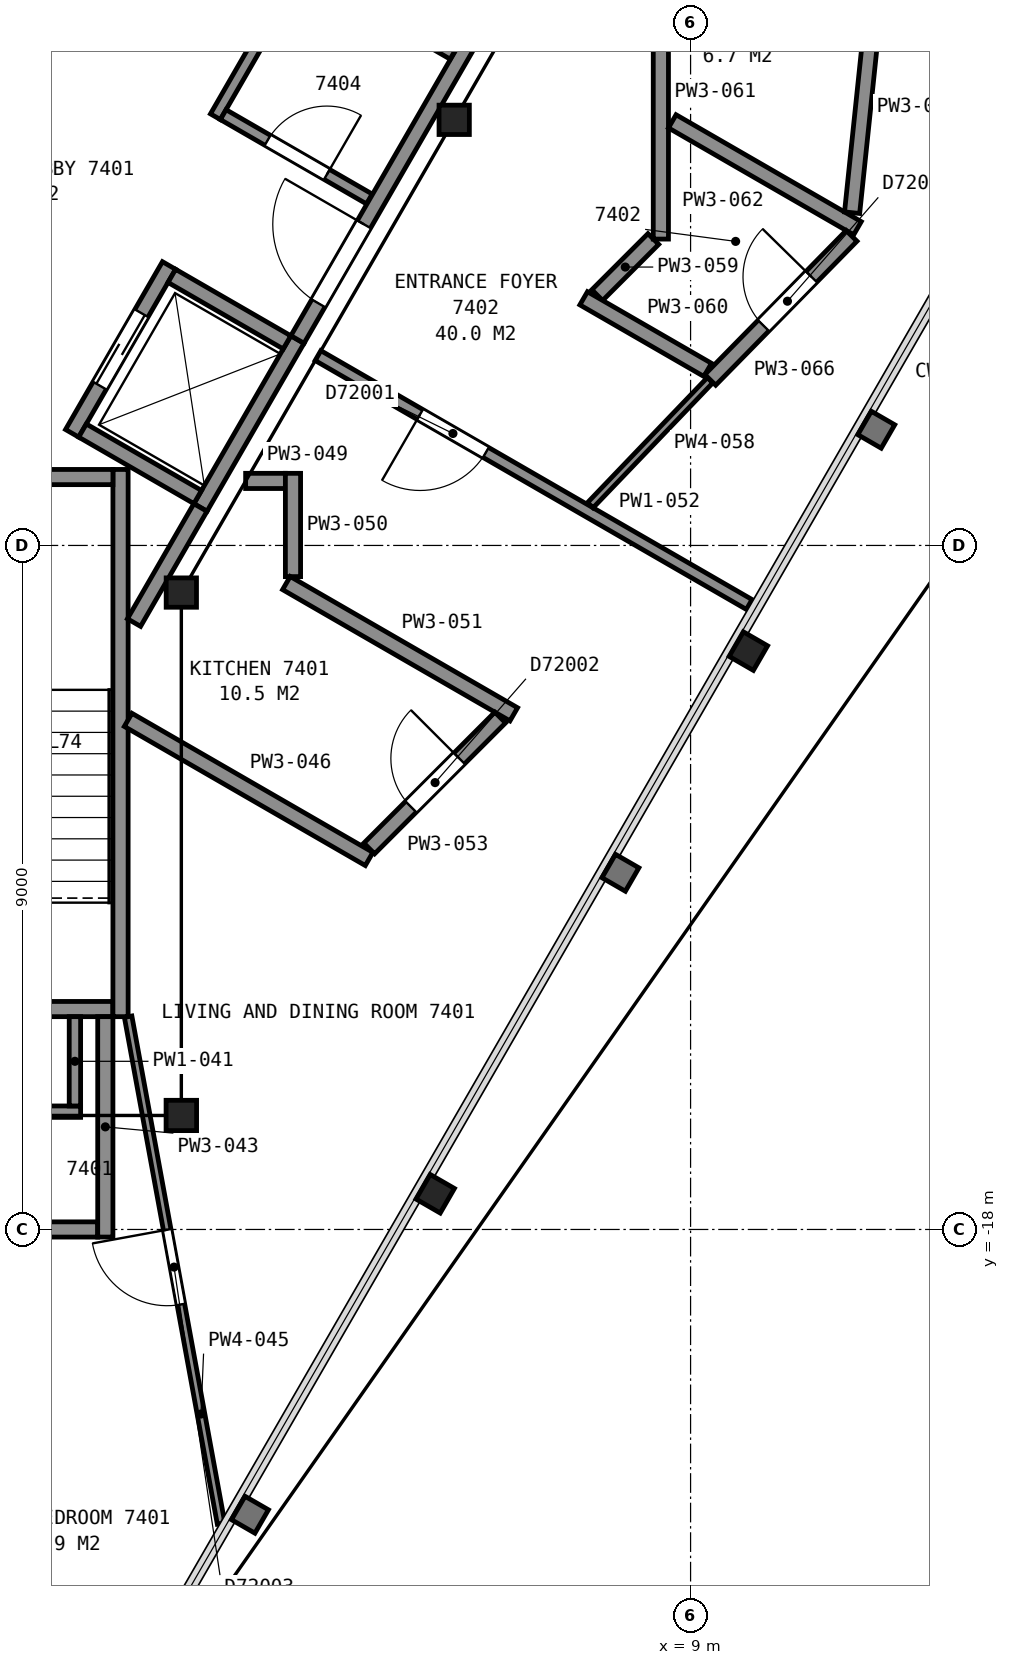
"""IFC4 building model, lengths in metres.
Left out: names, types, materials, properties, quantities, classifications, styles, units other than length and angle.
Written with IfcOpenShell. Run it as: python <this file> out.ifc"""

import sys

from ifc_helpers import new_model, si_unit, direction, frame, frame_2d, origin, origin_2d, place, context, subcontext, project, spatial, rectangle, i_section, extrude, element, fill, save


model = new_model("IFC4")
c1 = context("Model", 3, precision=1e-05, world=origin(), true_north=direction((0.0, 1.0)))
c2 = subcontext(c1, "Body", "Model", "MODEL_VIEW")
j1 = project(units=[si_unit("LENGTHUNIT", "METRE"), si_unit("PLANEANGLEUNIT", "RADIAN")], contexts=[c1])
p1 = place(None, origin())
s1 = spatial("IfcSite", under=j1, at=p1, CompositionType="ELEMENT")
p2 = place(p1, origin())
s2 = spatial("IfcBuilding", under=s1, at=p2, CompositionType="ELEMENT")
p3 = place(p2, frame((0.0, 0.0, 293.6)))
s3 = spatial("IfcBuildingStorey", under=s2, at=p3, CompositionType="ELEMENT", Elevation=293.6)
for number, where, z_axis, x_axis in (
    (1, (5.64, -17.53, 0.0), (0.0, 0.0, 1.0), (-0.5, -0.866, 0.0)),
    (2, (9.76, -10.39, 0.0), (0.0, 0.0, 1.0), (-0.5, -0.866, 0.0)),
):
    element("IfcColumn", number, at=place(p3, frame(where, z_axis=z_axis, x_axis=x_axis)), inside=s3, PredefinedType="COLUMN", context=c2, shape_type="SweptSolid", body=[
        extrude(i_section(OverallWidth=0.373, OverallDepth=0.368, WebThickness=0.015, FlangeThickness=0.024, FilletRadius=0.015, at=origin_2d()), origin(), (0.0, 0.0, 1.0), 3.7),
    ])
p4 = place(p3, frame((2.3, -16.5, 0.0), z_axis=(0.0, 0.0, 1.0), x_axis=(-1.0, 0.0, 0.0)))
e3 = element("IfcColumn", 3, at=p4, inside=s3, PredefinedType="COLUMN", context=c2, shape_type="SweptSolid", body=[
    extrude(i_section(OverallWidth=0.401, OverallDepth=0.399, WebThickness=0.025, FlangeThickness=0.04, FilletRadius=0.015, at=origin_2d()), origin(), (0.0, 0.0, 1.0), 3.7),
])
for number, where, z_axis, x_axis in (
    (4, (2.3, -9.62, 0.0), (0.0, 0.0, 1.0), (1.0, 0.0, 0.0)),
    (5, (5.89, -3.4, 0.0), (0.0, 0.0, 1.0), (1.0, 0.0, 0.0)),
):
    element("IfcColumn", number, at=place(p3, frame(where, z_axis=z_axis, x_axis=x_axis)), inside=s3, PredefinedType="COLUMN", context=c2, shape_type="SweptSolid", body=[
        extrude(i_section(OverallWidth=0.399, OverallDepth=0.386, WebThickness=0.021, FlangeThickness=0.033, FilletRadius=0.015, at=origin_2d()), origin(), (0.0, 0.0, 1.0), 3.7),
    ])
p5 = place(p3, frame((-1.4, -15.1, 0.0), z_axis=(0.0, 0.0, 1.0), x_axis=(1.0, 0.0, 0.0)))
e6 = element("IfcWall", 6, at=p5, inside=s3, PredefinedType="PARTITIONING", context=c2, shape_type="SweptSolid", body=[
    extrude(rectangle(XDim=2.8, YDim=0.2, at=frame_2d((1.4, 0.0))), origin(), (0.0, 0.0, 1.0), 3.45),
])
p6 = place(p5, frame((0.85, 0.0, 0.0)))
e7 = element("IfcOpeningElement", 7, at=p6, cuts=e6, PredefinedType="OPENING", context=c2, shape_type="SweptSolid", body=[
    extrude(rectangle(XDim=1.1, YDim=2.1, at=frame_2d((0.55, 1.05))), frame((0.0, 0.11, 0.0), z_axis=(0.0, -1.0, 0.0), x_axis=(1.0, 0.0, 0.0)), (0.0, 0.0, 1.0), 0.22),
])
p7 = place(p3, frame((1.5, -8.0, 0.0), z_axis=(0.0, 0.0, 1.0), x_axis=(0.0, -1.0, 0.0)))
e8 = element("IfcWall", 8, at=p7, inside=s3, PredefinedType="PARTITIONING", context=c2, shape_type="SweptSolid", body=[
    extrude(rectangle(XDim=7.2, YDim=0.2, at=frame_2d((3.6, 0.0))), origin(), (0.0, 0.0, 1.0), 3.45),
])
p8 = place(p3, frame((-1.4, -8.1, 0.0), z_axis=(0.0, 0.0, 1.0), x_axis=(1.0, 0.0, 0.0)))
e9 = element("IfcWall", 9, at=p8, inside=s3, PredefinedType="PARTITIONING", context=c2, shape_type="SweptSolid", body=[
    extrude(rectangle(XDim=2.8, YDim=0.2, at=frame_2d((1.4, 0.0))), origin(), (0.0, 0.0, 1.0), 3.45),
])
p9 = place(p3, frame((2.552, -8.5, 0.0), z_axis=(0.0, 0.0, 1.0), x_axis=(0.499990435942, 0.866030925526, 0.0)))
e10 = element("IfcWall", 10, at=p9, inside=s3, PredefinedType="PARTITIONING", context=c2, shape_type="SweptSolid", body=[
    extrude(rectangle(XDim=2.55, YDim=0.2, at=frame_2d((1.275, 0.0))), origin(), (0.0, 0.0, 1.0), 3.7),
])
p10 = place(p3, frame((0.863, -7.525, 0.0), z_axis=(0.0, 0.0, 1.0), x_axis=(0.499990435942, 0.866030925526, 0.0)))
e11 = element("IfcWall", 11, at=p10, inside=s3, PredefinedType="PARTITIONING", context=c2, shape_type="SweptSolid", body=[
    extrude(rectangle(XDim=2.55, YDim=0.2, at=frame_2d((1.275, 0.0))), origin(), (0.0, 0.0, 1.0), 3.7),
])
p11 = place(p10, frame((0.725, 0.0, 0.0)))
e12 = element("IfcOpeningElement", 12, at=p11, cuts=e11, PredefinedType="OPENING", context=c2, shape_type="SweptSolid", body=[
    extrude(rectangle(XDim=1.1, YDim=2.1, at=frame_2d((0.55, 1.05))), frame((0.0, 0.11, 0.0), z_axis=(0.0, -1.0, 0.0), x_axis=(1.0, 0.0, 0.0)), (0.0, 0.0, 1.0), 0.22),
])
for number, where, z_axis, x_axis in (
    (13, (3.69, -6.328, 0.0), (0.0, 0.0, 1.0), (-0.866, 0.5, 0.0)),
    (14, (2.515, -8.363, 0.0), (0.0, 0.0, 1.0), (-0.866, 0.5, 0.0)),
):
    element("IfcWall", number, at=place(p3, frame(where, z_axis=z_axis, x_axis=x_axis)), inside=s3, PredefinedType="PARTITIONING", context=c2, shape_type="SweptSolid", body=[
        extrude(rectangle(XDim=1.75, YDim=0.2, at=frame_2d((0.875, 0.0))), origin(), (0.0, 0.0, 1.0), 3.7),
    ])
p12 = place(p3, frame((1.677, -10.015, 0.0), z_axis=(0.0, 0.0, 1.0), x_axis=(0.49983532306, 0.866120459187, 0.0)))
e15 = element("IfcWall", 15, at=p12, inside=s3, PredefinedType="PARTITIONING", context=c2, shape_type="SweptSolid", body=[
    extrude(rectangle(XDim=1.748, YDim=0.2, at=frame_2d((0.874, 0.0))), origin(), (0.0, 0.0, 1.0), 3.45),
])
p13 = place(p3, frame((2.749, -3.359, 0.0), z_axis=(0.0, 0.0, 1.0), x_axis=(0.500017827812, 0.866015110648, 0.0)))
e16 = element("IfcWall", 16, at=p13, inside=s3, PredefinedType="PARTITIONING", context=c2, shape_type="SweptSolid", body=[
    extrude(rectangle(XDim=4.15, YDim=0.15, at=frame_2d((2.075, 0.0))), origin(), (0.0, 0.0, 1.0), 3.45),
])
p14 = place(p3, frame((2.851, -3.332, 0.0), z_axis=(0.0, 0.0, 1.0), x_axis=(0.866110524189, -0.499852538144, 0.0)))
e17 = element("IfcWall", 17, at=p14, inside=s3, PredefinedType="PARTITIONING", context=c2, shape_type="SweptSolid", body=[
    extrude(rectangle(XDim=2.22, YDim=0.15, at=frame_2d((1.11, 0.0))), origin(), (0.0, 0.0, 1.0), 3.45),
])
p15 = place(p14, frame((0.675, 0.0, 0.0)))
e18 = element("IfcOpeningElement", 18, at=p15, cuts=e17, PredefinedType="OPENING", context=c2, shape_type="SweptSolid", body=[
    extrude(rectangle(XDim=0.9, YDim=2.1, at=frame_2d((0.45, 1.05))), frame((0.0, 0.085, 0.0), z_axis=(0.0, -1.0, 0.0), x_axis=(1.0, 0.0, 0.0)), (0.0, 0.0, 1.0), 0.17),
])
p16 = place(p3, frame((3.828, -6.29, 0.0), z_axis=(0.0, 0.0, 1.0), x_axis=(0.499979739078, 0.866037101117, 0.0)))
e19 = element("IfcWall", 19, at=p16, inside=s3, PredefinedType="PARTITIONING", context=c2, shape_type="SweptSolid", body=[
    extrude(rectangle(XDim=11.363, YDim=0.2, at=frame_2d((5.681, 0.0))), origin(), (0.0, 0.0, 1.0), 3.45),
])
p17 = place(p16, frame((0.55, 0.0, 0.0)))
e20 = element("IfcOpeningElement", 20, at=p17, cuts=e19, PredefinedType="OPENING", context=c2, shape_type="SweptSolid", body=[
    extrude(rectangle(XDim=1.2, YDim=2.1, at=frame_2d((0.6, 1.05))), frame((0.0, 0.11, 0.0), z_axis=(0.0, -1.0, 0.0), x_axis=(1.0, 0.0, 0.0)), (0.0, 0.0, 1.0), 0.22),
])
p18 = place(p3, frame((3.951, -1.427, 0.0), z_axis=(0.0, 0.0, 1.0), x_axis=(0.866062920605, -0.499935013329, 0.0)))
e21 = element("IfcWall", 21, at=p18, inside=s3, PredefinedType="PARTITIONING", context=c2, shape_type="SweptSolid", body=[
    extrude(rectangle(XDim=2.22, YDim=0.15, at=frame_2d((1.11, 0.0))), origin(), (0.0, 0.0, 1.0), 3.45),
])
p19 = place(p3, frame((-1.65, -16.45, 0.0), z_axis=(0.0, 0.0, 1.0), x_axis=(1.0, 0.0, 0.0)))
e22 = element("IfcWall", 22, at=p19, inside=s3, PredefinedType="PARTITIONING", context=c2, shape_type="SweptSolid", body=[
    extrude(rectangle(XDim=2.625, YDim=0.15, at=frame_2d((1.312, 0.0))), origin(), (0.0, 0.0, 1.0), 2.723),
])
p20 = place(p3, frame((-1.211, -18.0, 0.0), z_axis=(0.0, 0.0, 1.0), x_axis=(1.0, 0.0, 0.0)))
e23 = element("IfcWall", 23, at=p20, inside=s3, PredefinedType="PARTITIONING", context=c2, shape_type="SweptSolid", body=[
    extrude(rectangle(XDim=2.411, YDim=0.2, at=frame_2d((1.206, 0.0))), origin(), (0.0, 0.0, 1.0), 2.723),
])
p21 = place(p20, frame((0.825, 0.0, 0.0)))
e24 = element("IfcOpeningElement", 24, at=p21, cuts=e23, PredefinedType="OPENING", context=c2, shape_type="SweptSolid", body=[
    extrude(rectangle(XDim=0.8, YDim=2.1, at=frame_2d((0.4, 1.05))), frame((0.0, 0.11, 0.0), z_axis=(0.0, -1.0, 0.0), x_axis=(1.0, 0.0, 0.0)), (0.0, 0.0, 1.0), 0.22),
])
p22 = place(p3, frame((0.9, -16.375, 0.0), z_axis=(0.0, 0.0, 1.0), x_axis=(0.0, 1.0, 0.0)))
e25 = element("IfcWall", 25, at=p22, inside=s3, PredefinedType="PARTITIONING", context=c2, shape_type="SweptSolid", body=[
    extrude(rectangle(XDim=1.175, YDim=0.15, at=frame_2d((0.587, 0.0))), origin(), (0.0, 0.0, 1.0), 2.723),
])
p23 = place(p3, frame((1.3, -18.1, 0.0), z_axis=(0.0, 0.0, 1.0), x_axis=(0.0, 1.0, 0.0)))
e26 = element("IfcWall", 26, at=p23, inside=s3, PredefinedType="PARTITIONING", context=c2, shape_type="SweptSolid", body=[
    extrude(rectangle(XDim=2.9, YDim=0.2, at=frame_2d((1.45, 0.0))), origin(), (0.0, 0.0, 1.0), 2.723),
])
p24 = place(p3, frame((2.823, -21.869, 0.0), z_axis=(0.0, 0.0, 1.0), x_axis=(-0.180317418333, 0.983608473248, 0.0)))
e27 = element("IfcWall", 27, at=p24, inside=s3, PredefinedType="PARTITIONING", context=c2, shape_type="SweptSolid", body=[
    extrude(rectangle(XDim=6.781, YDim=0.1, at=frame_2d((3.39, 0.0))), origin(), (0.0, 0.0, 1.0), 2.723),
])
p25 = place(p24, frame((2.931, 0.0, 0.0)))
e28 = element("IfcOpeningElement", 28, at=p25, cuts=e27, PredefinedType="OPENING", context=c2, shape_type="SweptSolid", body=[
    extrude(rectangle(XDim=1.0, YDim=2.1, at=frame_2d((0.5, 1.05))), frame((0.0, 0.06, 0.0), z_axis=(0.0, -1.0, 0.0), x_axis=(1.0, 0.0, 0.0)), (0.0, 0.0, 1.0), 0.12),
])
p26 = place(p3, frame((1.6, -11.295, 0.0), z_axis=(0.0, 0.0, 1.0), x_axis=(0.866067869506, -0.499926439998, 0.0)))
e29 = element("IfcWall", 29, at=p26, inside=s3, PredefinedType="PARTITIONING", context=c2, shape_type="SweptSolid", body=[
    extrude(rectangle(XDim=3.661, YDim=0.2, at=frame_2d((1.83, 0.0))), origin(), (0.0, 0.0, 1.0), 2.723),
])
p27 = place(p3, frame((3.146, -8.151, 0.0), z_axis=(0.0, 0.0, 1.0), x_axis=(1.0, 0.0, 0.0)))
e30 = element("IfcWall", 30, at=p27, inside=s3, PredefinedType="PARTITIONING", context=c2, shape_type="SweptSolid", body=[
    extrude(rectangle(XDim=0.523, YDim=0.2, at=frame_2d((0.261, 0.0))), origin(), (0.0, 0.0, 1.0), 2.723),
])
p28 = place(p3, frame((3.769, -9.41, 0.0), z_axis=(0.0, 0.0, 1.0), x_axis=(0.0, 1.0, 0.0)))
e31 = element("IfcWall", 31, at=p28, inside=s3, PredefinedType="PARTITIONING", context=c2, shape_type="SweptSolid", body=[
    extrude(rectangle(XDim=1.359, YDim=0.2, at=frame_2d((0.679, 0.0))), origin(), (0.0, 0.0, 1.0), 2.723),
])
p29 = place(p3, frame((3.682, -9.495, 0.0), z_axis=(0.0, 0.0, 1.0), x_axis=(0.866046690806, -0.499963127985, 0.0)))
e32 = element("IfcWall", 32, at=p29, inside=s3, PredefinedType="PARTITIONING", context=c2, shape_type="SweptSolid", body=[
    extrude(rectangle(XDim=3.454, YDim=0.2, at=frame_2d((1.727, 0.0))), origin(), (0.0, 0.0, 1.0), 2.723),
])
p30 = place(p3, frame((9.772, -9.777, 0.0), z_axis=(0.0, 0.0, 1.0), x_axis=(-0.866083818164, 0.499898809675, 0.0)))
e33 = element("IfcWall", 33, at=p30, inside=s3, PredefinedType="PARTITIONING", context=c2, shape_type="SweptSolid", body=[
    extrude(rectangle(XDim=6.551, YDim=0.15, at=frame_2d((3.275, 0.0))), origin(), (0.0, 0.0, 1.0), 2.723),
])
p31 = place(p30, frame((4.001, 0.0, 0.0)))
e34 = element("IfcOpeningElement", 34, at=p31, cuts=e33, PredefinedType="OPENING", context=c2, shape_type="SweptSolid", body=[
    extrude(rectangle(XDim=1.0, YDim=2.1, at=frame_2d((0.5, 1.05))), frame((0.0, 0.085, 0.0), z_axis=(0.0, -1.0, 0.0), x_axis=(1.0, 0.0, 0.0)), (0.0, 0.0, 1.0), 0.17),
])
p32 = place(p3, frame((4.772, -12.987, 0.0), z_axis=(0.0, 0.0, 1.0), x_axis=(0.707106781187, 0.707106781187, 0.0)))
e35 = element("IfcWall", 35, at=p32, inside=s3, PredefinedType="PARTITIONING", context=c2, shape_type="SweptSolid", body=[
    extrude(rectangle(XDim=2.436, YDim=0.2, at=frame_2d((1.218, 0.0))), origin(), (0.0, 0.0, 1.0), 2.723),
])
p33 = place(p32, frame((0.775, 0.0, 0.0)))
e36 = element("IfcOpeningElement", 36, at=p33, cuts=e35, PredefinedType="OPENING", context=c2, shape_type="SweptSolid", body=[
    extrude(rectangle(XDim=0.9, YDim=2.1, at=frame_2d((0.45, 1.05))), frame((0.0, 0.11, 0.0), z_axis=(0.0, -1.0, 0.0), x_axis=(1.0, 0.0, 0.0)), (0.0, 0.0, 1.0), 0.22),
])
p34 = place(p3, frame((7.681, -8.47, 0.0), z_axis=(0.0, 0.0, 1.0), x_axis=(0.691774963189, 0.722113149239, 0.0)))
e37 = element("IfcWall", 37, at=p34, inside=s3, PredefinedType="PARTITIONING", context=c2, shape_type="SweptSolid", body=[
    extrude(rectangle(XDim=2.277, YDim=0.1, at=frame_2d((1.139, 0.0))), origin(), (0.0, 0.0, 1.0), 2.723),
])
p35 = place(p3, frame((7.772, -5.706, 0.0), z_axis=(0.0, 0.0, 1.0), x_axis=(0.707106781187, 0.707106781187, 0.0)))
e38 = element("IfcWall", 38, at=p35, inside=s3, PredefinedType="PARTITIONING", context=c2, shape_type="SweptSolid", body=[
    extrude(rectangle(XDim=1.044, YDim=0.2, at=frame_2d((0.522, 0.0))), origin(), (0.0, 0.0, 1.0), 2.723),
])
p36 = place(p3, frame((7.594, -5.748, 0.0), z_axis=(0.0, 0.0, 1.0), x_axis=(0.866049635583, -0.499958026946, 0.0)))
e39 = element("IfcWall", 39, at=p36, inside=s3, PredefinedType="PARTITIONING", context=c2, shape_type="SweptSolid", body=[
    extrude(rectangle(XDim=1.884, YDim=0.2, at=frame_2d((0.942, 0.0))), origin(), (0.0, 0.0, 1.0), 2.723),
])
p37 = place(p3, frame((8.609, -4.969, 0.0), z_axis=(0.0, 0.0, 1.0), x_axis=(0.0, 1.0, 0.0)))
e40 = element("IfcWall", 40, at=p37, inside=s3, PredefinedType="PARTITIONING", context=c2, shape_type="SweptSolid", body=[
    extrude(rectangle(XDim=3.881, YDim=0.2, at=frame_2d((1.94, 0.0))), origin(), (0.0, 0.0, 1.0), 2.723),
])
p38 = place(p3, frame((8.759, -3.42, 0.0), z_axis=(0.0, 0.0, 1.0), x_axis=(0.866098885879, -0.499872703674, 0.0)))
e41 = element("IfcWall", 41, at=p38, inside=s3, PredefinedType="PARTITIONING", context=c2, shape_type="SweptSolid", body=[
    extrude(rectangle(XDim=2.813, YDim=0.2, at=frame_2d((1.407, 0.0))), origin(), (0.0, 0.0, 1.0), 2.723),
])
p39 = place(p3, frame((9.259, -6.821, 0.0), z_axis=(0.0, 0.0, 1.0), x_axis=(0.700360124324, 0.713789672282, 0.0)))
e42 = element("IfcWall", 42, at=p39, inside=s3, PredefinedType="PARTITIONING", context=c2, shape_type="SweptSolid", body=[
    extrude(rectangle(XDim=2.654, YDim=0.2, at=frame_2d((1.327, 0.0))), origin(), (0.0, 0.0, 1.0), 2.723),
])
p40 = place(p39, frame((1.0, 0.0, 0.0)))
e43 = element("IfcOpeningElement", 43, at=p40, cuts=e42, PredefinedType="OPENING", context=c2, shape_type="SweptSolid", body=[
    extrude(rectangle(XDim=0.9, YDim=2.1, at=frame_2d((0.45, 1.05))), frame((0.0, 0.11, 0.0), z_axis=(0.0, -1.0, 0.0), x_axis=(1.0, 0.0, 0.0)), (0.0, 0.0, 1.0), 0.22),
])
p41 = place(p3, frame((11.125, -4.622, 0.0), z_axis=(0.0, 0.0, 1.0), x_axis=(0.103952036587, 0.99458231137, 0.0)))
e44 = element("IfcWall", 44, at=p41, inside=s3, PredefinedType="PARTITIONING", context=c2, shape_type="SweptSolid", body=[
    extrude(rectangle(XDim=2.792, YDim=0.2, at=frame_2d((1.396, 0.0))), origin(), (0.0, 0.0, 1.0), 2.723),
])
p42 = place(p11, origin())
e45 = element("IfcDoor", 45, at=p42, inside=s3, OperationType="SLIDING_TO_LEFT", PredefinedType="DOOR", context=c2, shape_type="SweptSolid", body=[
    extrude(rectangle(XDim=1.1, YDim=2.1, at=frame_2d((0.55, 1.05))), frame((0.0, 0.025, 0.0), z_axis=(0.0, -1.0, 0.0), x_axis=(1.0, 0.0, 0.0)), (0.0, 0.0, 1.0), 0.05),
])
fill(e12, e45)
p43 = place(p15, origin())
e46 = element("IfcDoor", 46, at=p43, inside=s3, OperationType="SINGLE_SWING_RIGHT", PredefinedType="DOOR", context=c2, shape_type="SweptSolid", body=[
    extrude(rectangle(XDim=0.9, YDim=2.1, at=frame_2d((0.45, 1.05))), frame((0.0, 0.025, 0.0), z_axis=(0.0, -1.0, 0.0), x_axis=(1.0, 0.0, 0.0)), (0.0, 0.0, 1.0), 0.05),
])
fill(e18, e46)
p44 = place(p17, origin())
e47 = element("IfcDoor", 47, at=p44, inside=s3, OperationType="SINGLE_SWING_RIGHT", PredefinedType="DOOR", context=c2, shape_type="SweptSolid", body=[
    extrude(rectangle(XDim=1.2, YDim=2.1, at=frame_2d((0.6, 1.05))), frame((0.0, 0.025, 0.0), z_axis=(0.0, -1.0, 0.0), x_axis=(1.0, 0.0, 0.0)), (0.0, 0.0, 1.0), 0.05),
])
fill(e20, e47)
p45 = place(p25, origin())
e48 = element("IfcDoor", 48, at=p45, inside=s3, OperationType="SINGLE_SWING_RIGHT", PredefinedType="DOOR", context=c2, shape_type="SweptSolid", body=[
    extrude(rectangle(XDim=1.0, YDim=2.1, at=frame_2d((0.5, 1.05))), frame((0.0, 0.025, 0.0), z_axis=(0.0, -1.0, 0.0), x_axis=(1.0, 0.0, 0.0)), (0.0, 0.0, 1.0), 0.05),
])
fill(e28, e48)
p46 = place(p31, origin())
e49 = element("IfcDoor", 49, at=p46, inside=s3, OperationType="SINGLE_SWING_RIGHT", PredefinedType="DOOR", context=c2, shape_type="SweptSolid", body=[
    extrude(rectangle(XDim=1.0, YDim=2.1, at=frame_2d((0.5, 1.05))), frame((0.0, 0.025, 0.0), z_axis=(0.0, -1.0, 0.0), x_axis=(1.0, 0.0, 0.0)), (0.0, 0.0, 1.0), 0.05),
])
fill(e34, e49)
p47 = place(p33, origin())
e50 = element("IfcDoor", 50, at=p47, inside=s3, OperationType="SINGLE_SWING_RIGHT", PredefinedType="DOOR", context=c2, shape_type="SweptSolid", body=[
    extrude(rectangle(XDim=0.9, YDim=2.1, at=frame_2d((0.45, 1.05))), frame((0.0, 0.025, 0.0), z_axis=(0.0, -1.0, 0.0), x_axis=(1.0, 0.0, 0.0)), (0.0, 0.0, 1.0), 0.05),
])
fill(e36, e50)
p48 = place(p40, origin())
e51 = element("IfcDoor", 51, at=p48, inside=s3, OperationType="SINGLE_SWING_RIGHT", PredefinedType="DOOR", context=c2, shape_type="SweptSolid", body=[
    extrude(rectangle(XDim=0.9, YDim=2.1, at=frame_2d((0.45, 1.05))), frame((0.0, 0.025, 0.0), z_axis=(0.0, -1.0, 0.0), x_axis=(1.0, 0.0, 0.0)), (0.0, 0.0, 1.0), 0.05),
])
fill(e43, e51)
save(model, sys.argv[1])
